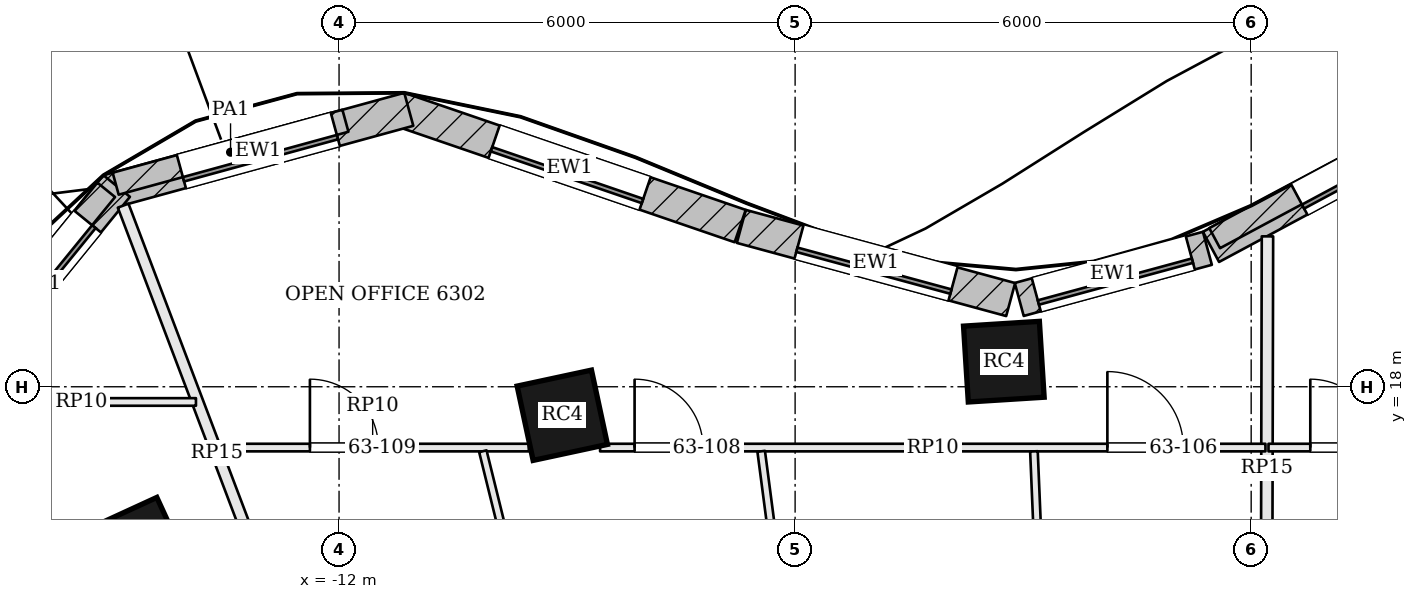
"""IFC4 building model, lengths in metres.
Left out: names, types, materials, properties, quantities, classifications, styles, units other than length and angle.
Written with IfcOpenShell. Run it as: python <this file> out.ifc"""

import sys

from ifc_helpers import new_model, si_unit, direction, frame, frame_2d, origin, origin_2d, place, context, subcontext, project, spatial, rectangle, extrude, element, fill, save


model = new_model("IFC4")
c1 = context("Model", 3, precision=1e-05, world=origin(), true_north=direction((0.0, 1.0)))
c2 = subcontext(c1, "Body", "Model", "MODEL_VIEW")
j1 = project(units=[si_unit("LENGTHUNIT", "METRE"), si_unit("PLANEANGLEUNIT", "RADIAN")], contexts=[c1])
p1 = place(None, origin())
s1 = spatial("IfcSite", under=j1, at=p1, CompositionType="ELEMENT")
p2 = place(p1, origin())
s2 = spatial("IfcBuilding", under=s1, at=p2, CompositionType="ELEMENT")
p3 = place(p2, frame((0.0, 0.0, 256.5)))
s3 = spatial("IfcBuildingStorey", under=s2, at=p3, CompositionType="ELEMENT", Elevation=256.5)
for number, where, z_axis, x_axis in (
    (1, (-3.254, 18.33, 0.0), (0.0, 0.0, 1.0), (-0.998, -0.063, 0.0)),
    (2, (-9.063, 17.625, 0.0), (0.0, 0.0, 1.0), (-0.978, -0.21, 0.0)),
    (3, (-14.643, 15.881, 0.0), (0.0, 0.0, 1.0), (-0.909, -0.417, 0.0)),
):
    element("IfcColumn", number, at=place(p3, frame(where, z_axis=z_axis, x_axis=x_axis)), inside=s3, PredefinedType="COLUMN", context=c2, shape_type="SweptSolid", body=[
        extrude(rectangle(XDim=1.0, YDim=1.0, at=origin_2d()), origin(), (0.0, 0.0, 1.0), 3.9),
    ])
p4 = place(p3, frame((3.646, 22.079, 0.0), z_axis=(0.0, 0.0, 1.0), x_axis=(-0.881279133897, -0.472596115259, 0.0)))
e4 = element("IfcWall", 4, at=p4, inside=s3, PredefinedType="SOLIDWALL", context=c2, shape_type="SweptSolid", body=[
    extrude(rectangle(XDim=4.737, YDim=0.45, at=frame_2d((2.368, 0.0))), origin(), (0.0, 0.0, 1.0), 3.7),
])
p5 = place(p4, frame((1.318, 0.0, 0.9)))
e5 = element("IfcOpeningElement", 5, at=p5, cuts=e4, PredefinedType="OPENING", context=c2, shape_type="SweptSolid", body=[
    extrude(rectangle(XDim=2.1, YDim=2.3, at=frame_2d((1.05, 1.15))), frame((0.0, 0.235, 0.0), z_axis=(0.0, -1.0, 0.0), x_axis=(1.0, 0.0, 0.0)), (0.0, 0.0, 1.0), 0.47),
])
p6 = place(p3, frame((-0.576, 19.821, 0.0), z_axis=(0.0, 0.0, 1.0), x_axis=(-0.965009398019, -0.262215296532, 0.0)))
e6 = element("IfcWall", 6, at=p6, inside=s3, PredefinedType="SOLIDWALL", context=c2, shape_type="SweptSolid", body=[
    extrude(rectangle(XDim=2.565, YDim=0.45, at=frame_2d((1.283, 0.0))), origin(), (0.0, 0.0, 1.0), 3.7),
])
p7 = place(p6, frame((0.233, 0.0, 0.9)))
e7 = element("IfcOpeningElement", 7, at=p7, cuts=e6, PredefinedType="OPENING", context=c2, shape_type="SweptSolid", body=[
    extrude(rectangle(XDim=2.1, YDim=2.3, at=frame_2d((1.05, 1.15))), frame((0.0, 0.235, 0.0), z_axis=(0.0, -1.0, 0.0), x_axis=(1.0, 0.0, 0.0)), (0.0, 0.0, 1.0), 0.47),
])
p8 = place(p3, frame((-3.164, 19.147, 0.0), z_axis=(0.0, 0.0, 1.0), x_axis=(-0.965039479998, 0.262104563191, 0.0)))
e8 = element("IfcWall", 8, at=p8, inside=s3, PredefinedType="SOLIDWALL", context=c2, shape_type="SweptSolid", body=[
    extrude(rectangle(XDim=3.672, YDim=0.45, at=frame_2d((1.836, 0.0))), origin(), (0.0, 0.0, 1.0), 3.7),
])
p9 = place(p8, frame((0.786, 0.0, 0.9)))
e9 = element("IfcOpeningElement", 9, at=p9, cuts=e8, PredefinedType="OPENING", context=c2, shape_type="SweptSolid", body=[
    extrude(rectangle(XDim=2.1, YDim=2.3, at=frame_2d((1.05, 1.15))), frame((0.0, 0.235, 0.0), z_axis=(0.0, -1.0, 0.0), x_axis=(1.0, 0.0, 0.0)), (0.0, 0.0, 1.0), 0.47),
])
p10 = place(p3, frame((-6.723, 20.114, 0.0), z_axis=(0.0, 0.0, 1.0), x_axis=(-0.945947299026, 0.324320377815, 0.0)))
e10 = element("IfcWall", 10, at=p10, inside=s3, PredefinedType="SOLIDWALL", context=c2, shape_type="SweptSolid", body=[
    extrude(rectangle(XDim=4.745, YDim=0.45, at=frame_2d((2.372, 0.0))), origin(), (0.0, 0.0, 1.0), 3.7),
])
p11 = place(p10, frame((1.322, 0.0, 0.9)))
e11 = element("IfcOpeningElement", 11, at=p11, cuts=e10, PredefinedType="OPENING", context=c2, shape_type="SweptSolid", body=[
    extrude(rectangle(XDim=2.1, YDim=2.3, at=frame_2d((1.05, 1.15))), frame((0.0, 0.235, 0.0), z_axis=(0.0, -1.0, 0.0), x_axis=(1.0, 0.0, 0.0)), (0.0, 0.0, 1.0), 0.47),
])
p12 = place(p3, frame((-11.083, 21.65, 0.0), z_axis=(0.0, 0.0, 1.0), x_axis=(-0.964483204983, -0.264144179011, 0.0)))
e12 = element("IfcWall", 12, at=p12, inside=s3, PredefinedType="SOLIDWALL", context=c2, shape_type="SweptSolid", body=[
    extrude(rectangle(XDim=4.104, YDim=0.45, at=frame_2d((2.052, 0.0))), origin(), (0.0, 0.0, 1.0), 3.7),
])
p13 = place(p12, frame((1.002, 0.0, 0.9)))
e13 = element("IfcOpeningElement", 13, at=p13, cuts=e12, PredefinedType="OPENING", context=c2, shape_type="SweptSolid", body=[
    extrude(rectangle(XDim=2.1, YDim=2.3, at=frame_2d((1.05, 1.15))), frame((0.0, 0.235, 0.0), z_axis=(0.0, -1.0, 0.0), x_axis=(1.0, 0.0, 0.0)), (0.0, 0.0, 1.0), 0.47),
])
p14 = place(p3, frame((-14.926, 20.641, 0.0), z_axis=(0.0, 0.0, 1.0), x_axis=(-0.631548074669, -0.775336720001, 0.0)))
e14 = element("IfcWall", 14, at=p14, inside=s3, PredefinedType="SOLIDWALL", context=c2, shape_type="SweptSolid", body=[
    extrude(rectangle(XDim=3.308, YDim=0.45, at=frame_2d((1.654, 0.0))), origin(), (0.0, 0.0, 1.0), 3.7),
])
p15 = place(p14, frame((0.604, 0.0, 0.9)))
e15 = element("IfcOpeningElement", 15, at=p15, cuts=e14, PredefinedType="OPENING", context=c2, shape_type="SweptSolid", body=[
    extrude(rectangle(XDim=2.1, YDim=2.3, at=frame_2d((1.05, 1.15))), frame((0.0, 0.235, 0.0), z_axis=(0.0, -1.0, 0.0), x_axis=(1.0, 0.0, 0.0)), (0.0, 0.0, 1.0), 0.47),
])
p16 = place(p3, frame((3.53, 22.106, 3.9), z_axis=(0.0, 0.0, 1.0), x_axis=(-0.881258931682, -0.472633785643, 0.0)))
e16 = element("IfcWall", 16, at=p16, inside=s3, PredefinedType="PARAPET", context=c2, shape_type="SweptSolid", body=[
    extrude(rectangle(XDim=4.55, YDim=0.3, at=frame_2d((2.275, 0.0))), origin(), (0.0, 0.0, 1.0), 1.1),
])
p17 = place(p3, frame((-11.916, 21.5, 3.9), z_axis=(0.0, 0.0, 1.0), x_axis=(-0.964473787466, -0.264178563271, 0.0)))
e17 = element("IfcWall", 17, at=p17, inside=s3, PredefinedType="PARAPET", context=c2, shape_type="SweptSolid", body=[
    extrude(rectangle(XDim=3.134, YDim=0.3, at=frame_2d((1.567, 0.0))), origin(), (0.0, 0.0, 1.0), 1.1),
])
p18 = place(p3, frame((-15.063, 20.591, 3.9), z_axis=(0.0, 0.0, 1.0), x_axis=(-0.631539712948, -0.775343530939, 0.0)))
e18 = element("IfcWall", 18, at=p18, inside=s3, PredefinedType="PARAPET", context=c2, shape_type="SweptSolid", body=[
    extrude(rectangle(XDim=3.182, YDim=0.3, at=frame_2d((1.591, 0.0))), origin(), (0.0, 0.0, 1.0), 1.1),
])
p19 = place(p3, frame((0.214, 19.979, 0.0), z_axis=(0.0, 0.0, 1.0), x_axis=(-0.002359899032, -0.999997215434, 0.0)))
e19 = element("IfcWall", 19, at=p19, inside=s3, PredefinedType="PARTITIONING", context=c2, shape_type="SweptSolid", body=[
    extrude(rectangle(XDim=6.104, YDim=0.15, at=frame_2d((3.052, 0.0))), origin(), (0.0, 0.0, 1.0), 3.084),
])
p20 = place(p3, frame((-14.841, 20.383, 0.0), z_axis=(0.0, 0.0, 1.0), x_axis=(0.354547510081, -0.935038000883, 0.0)))
e20 = element("IfcWall", 20, at=p20, inside=s3, PredefinedType="PARTITIONING", context=c2, shape_type="SweptSolid", body=[
    extrude(rectangle(XDim=6.965, YDim=0.15, at=frame_2d((3.482, 0.0))), origin(), (0.0, 0.0, 1.0), 3.084),
])
p21 = place(p3, frame((0.228, 17.2, 0.0), z_axis=(0.0, 0.0, 1.0), x_axis=(1.0, 0.0, 0.0)))
e21 = element("IfcWall", 21, at=p21, inside=s3, PredefinedType="PARTITIONING", context=c2, shape_type="SweptSolid", body=[
    extrude(rectangle(XDim=8.293, YDim=0.1, at=frame_2d((4.147, 0.0))), origin(), (0.0, 0.0, 1.0), 3.084),
])
p22 = place(p21, frame((0.55, 0.0, 0.0)))
e22 = element("IfcOpeningElement", 22, at=p22, cuts=e21, PredefinedType="OPENING", context=c2, shape_type="SweptSolid", body=[
    extrude(rectangle(XDim=0.9, YDim=2.1, at=frame_2d((0.45, 1.05))), frame((0.0, 0.06, 0.0), z_axis=(0.0, -1.0, 0.0), x_axis=(1.0, 0.0, 0.0)), (0.0, 0.0, 1.0), 0.12),
])
p23 = place(p3, frame((-13.612, 17.2, 0.0), z_axis=(0.0, 0.0, 1.0), x_axis=(1.0, 0.0, 0.0)))
e23 = element("IfcWall", 23, at=p23, inside=s3, PredefinedType="PARTITIONING", context=c2, shape_type="SweptSolid", body=[
    extrude(rectangle(XDim=4.109, YDim=0.1, at=frame_2d((2.054, 0.0))), origin(), (0.0, 0.0, 1.0), 3.084),
])
p24 = place(p23, frame((1.229, 0.0, 0.0)))
e24 = element("IfcOpeningElement", 24, at=p24, cuts=e23, PredefinedType="OPENING", context=c2, shape_type="SweptSolid", body=[
    extrude(rectangle(XDim=0.9, YDim=2.1, at=frame_2d((0.45, 1.05))), frame((0.0, 0.06, 0.0), z_axis=(0.0, -1.0, 0.0), x_axis=(1.0, 0.0, 0.0)), (0.0, 0.0, 1.0), 0.12),
])
p25 = place(p3, frame((-8.566, 17.2, 0.0), z_axis=(0.0, 0.0, 1.0), x_axis=(1.0, 0.0, 0.0)))
e25 = element("IfcWall", 25, at=p25, inside=s3, PredefinedType="PARTITIONING", context=c2, shape_type="SweptSolid", body=[
    extrude(rectangle(XDim=8.754, YDim=0.1, at=frame_2d((4.377, 0.0))), origin(), (0.0, 0.0, 1.0), 3.084),
])
p26 = place(p25, frame((6.674, 0.0, 0.0)))
e26 = element("IfcOpeningElement", 26, at=p26, cuts=e25, PredefinedType="OPENING", context=c2, shape_type="SweptSolid", body=[
    extrude(rectangle(XDim=1.0, YDim=2.1, at=frame_2d((0.5, 1.05))), frame((0.0, 0.06, 0.0), z_axis=(0.0, -1.0, 0.0), x_axis=(1.0, 0.0, 0.0)), (0.0, 0.0, 1.0), 0.12),
])
p27 = place(p25, frame((0.454, 0.0, 0.0)))
e27 = element("IfcOpeningElement", 27, at=p27, cuts=e25, PredefinedType="OPENING", context=c2, shape_type="SweptSolid", body=[
    extrude(rectangle(XDim=0.9, YDim=2.1, at=frame_2d((0.45, 1.05))), frame((0.0, 0.06, 0.0), z_axis=(0.0, -1.0, 0.0), x_axis=(1.0, 0.0, 0.0)), (0.0, 0.0, 1.0), 0.12),
])
p28 = place(p3, frame((-2.72, 13.875, 0.0), z_axis=(0.0, 0.0, 1.0), x_axis=(-0.042008508326, 0.999117252993, 0.0)))
e28 = element("IfcWall", 28, at=p28, inside=s3, PredefinedType="PARTITIONING", context=c2, shape_type="SweptSolid", body=[
    extrude(rectangle(XDim=3.278, YDim=0.1, at=frame_2d((1.639, 0.0))), origin(), (0.0, 0.0, 1.0), 3.084),
])
p29 = place(p3, frame((-6.017, 13.875, 0.0), z_axis=(0.0, 0.0, 1.0), x_axis=(-0.12990779889, 0.991526078219, 0.0)))
e29 = element("IfcWall", 29, at=p29, inside=s3, PredefinedType="PARTITIONING", context=c2, shape_type="SweptSolid", body=[
    extrude(rectangle(XDim=3.304, YDim=0.1, at=frame_2d((1.652, 0.0))), origin(), (0.0, 0.0, 1.0), 3.084),
])
p30 = place(p3, frame((-9.298, 13.873, 0.0), z_axis=(0.0, 0.0, 1.0), x_axis=(-0.239779199404, 0.970827448898, 0.0)))
e30 = element("IfcWall", 30, at=p30, inside=s3, PredefinedType="PARTITIONING", context=c2, shape_type="SweptSolid", body=[
    extrude(rectangle(XDim=3.377, YDim=0.1, at=frame_2d((1.689, 0.0))), origin(), (0.0, 0.0, 1.0), 3.084),
])
p31 = place(p3, frame((-16.897, 17.8, 0.0), z_axis=(0.0, 0.0, 1.0), x_axis=(1.0, 0.0, 0.0)))
e31 = element("IfcWall", 31, at=p31, inside=s3, PredefinedType="PARTITIONING", context=c2, shape_type="SweptSolid", body=[
    extrude(rectangle(XDim=3.014, YDim=0.1, at=frame_2d((1.507, 0.0))), origin(), (0.0, 0.0, 1.0), 3.084),
])
p32 = place(p3, frame((-14.835, 12.858, 0.0), z_axis=(0.0, 0.0, 1.0), x_axis=(-0.46402494572, 0.885822132118, 0.0)))
e32 = element("IfcWall", 32, at=p32, inside=s3, PredefinedType="PARTITIONING", context=c2, shape_type="SweptSolid", body=[
    extrude(rectangle(XDim=5.082, YDim=0.1, at=frame_2d((2.541, 0.0))), origin(), (0.0, 0.0, 1.0), 3.084),
])
p33 = place(p5, origin())
e33 = element("IfcWindow", 33, at=p33, inside=s3, PartitioningType="SINGLE_PANEL", PredefinedType="WINDOW", context=c2, shape_type="SweptSolid", body=[
    extrude(rectangle(XDim=2.1, YDim=2.3, at=frame_2d((1.05, 1.15))), frame((0.0, 0.135, 0.0), z_axis=(0.0, -1.0, 0.0), x_axis=(1.0, 0.0, 0.0)), (0.0, 0.0, 1.0), 0.06),
])
fill(e5, e33)
p34 = place(p7, origin())
e34 = element("IfcWindow", 34, at=p34, inside=s3, PartitioningType="SINGLE_PANEL", PredefinedType="WINDOW", context=c2, shape_type="SweptSolid", body=[
    extrude(rectangle(XDim=2.1, YDim=2.3, at=frame_2d((1.05, 1.15))), frame((0.0, 0.135, 0.0), z_axis=(0.0, -1.0, 0.0), x_axis=(1.0, 0.0, 0.0)), (0.0, 0.0, 1.0), 0.06),
])
fill(e7, e34)
p35 = place(p9, origin())
e35 = element("IfcWindow", 35, at=p35, inside=s3, PartitioningType="SINGLE_PANEL", PredefinedType="WINDOW", context=c2, shape_type="SweptSolid", body=[
    extrude(rectangle(XDim=2.1, YDim=2.3, at=frame_2d((1.05, 1.15))), frame((0.0, 0.135, 0.0), z_axis=(0.0, -1.0, 0.0), x_axis=(1.0, 0.0, 0.0)), (0.0, 0.0, 1.0), 0.06),
])
fill(e9, e35)
p36 = place(p11, origin())
e36 = element("IfcWindow", 36, at=p36, inside=s3, PartitioningType="SINGLE_PANEL", PredefinedType="WINDOW", context=c2, shape_type="SweptSolid", body=[
    extrude(rectangle(XDim=2.1, YDim=2.3, at=frame_2d((1.05, 1.15))), frame((0.0, 0.135, 0.0), z_axis=(0.0, -1.0, 0.0), x_axis=(1.0, 0.0, 0.0)), (0.0, 0.0, 1.0), 0.06),
])
fill(e11, e36)
p37 = place(p13, origin())
e37 = element("IfcWindow", 37, at=p37, inside=s3, PartitioningType="SINGLE_PANEL", PredefinedType="WINDOW", context=c2, shape_type="SweptSolid", body=[
    extrude(rectangle(XDim=2.1, YDim=2.3, at=frame_2d((1.05, 1.15))), frame((0.0, 0.135, 0.0), z_axis=(0.0, -1.0, 0.0), x_axis=(1.0, 0.0, 0.0)), (0.0, 0.0, 1.0), 0.06),
])
fill(e13, e37)
p38 = place(p15, origin())
e38 = element("IfcWindow", 38, at=p38, inside=s3, PartitioningType="SINGLE_PANEL", PredefinedType="WINDOW", context=c2, shape_type="SweptSolid", body=[
    extrude(rectangle(XDim=2.1, YDim=2.3, at=frame_2d((1.05, 1.15))), frame((0.0, 0.135, 0.0), z_axis=(0.0, -1.0, 0.0), x_axis=(1.0, 0.0, 0.0)), (0.0, 0.0, 1.0), 0.06),
])
fill(e15, e38)
p39 = place(p22, origin())
e39 = element("IfcDoor", 39, at=p39, inside=s3, OperationType="SINGLE_SWING_LEFT", PredefinedType="DOOR", context=c2, shape_type="SweptSolid", body=[
    extrude(rectangle(XDim=0.9, YDim=2.1, at=frame_2d((0.45, 1.05))), frame((0.0, 0.025, 0.0), z_axis=(0.0, -1.0, 0.0), x_axis=(1.0, 0.0, 0.0)), (0.0, 0.0, 1.0), 0.05),
])
fill(e22, e39)
p40 = place(p26, origin())
e40 = element("IfcDoor", 40, at=p40, inside=s3, OperationType="SINGLE_SWING_LEFT", PredefinedType="DOOR", context=c2, shape_type="SweptSolid", body=[
    extrude(rectangle(XDim=1.0, YDim=2.1, at=frame_2d((0.5, 1.05))), frame((0.0, 0.025, 0.0), z_axis=(0.0, -1.0, 0.0), x_axis=(1.0, 0.0, 0.0)), (0.0, 0.0, 1.0), 0.05),
])
fill(e26, e40)
p41 = place(p27, origin())
e41 = element("IfcDoor", 41, at=p41, inside=s3, OperationType="SINGLE_SWING_LEFT", PredefinedType="DOOR", context=c2, shape_type="SweptSolid", body=[
    extrude(rectangle(XDim=0.9, YDim=2.1, at=frame_2d((0.45, 1.05))), frame((0.0, 0.025, 0.0), z_axis=(0.0, -1.0, 0.0), x_axis=(1.0, 0.0, 0.0)), (0.0, 0.0, 1.0), 0.05),
])
fill(e27, e41)
p42 = place(p24, origin())
e42 = element("IfcDoor", 42, at=p42, inside=s3, OperationType="SINGLE_SWING_LEFT", PredefinedType="DOOR", context=c2, shape_type="SweptSolid", body=[
    extrude(rectangle(XDim=0.9, YDim=2.1, at=frame_2d((0.45, 1.05))), frame((0.0, 0.025, 0.0), z_axis=(0.0, -1.0, 0.0), x_axis=(1.0, 0.0, 0.0)), (0.0, 0.0, 1.0), 0.05),
])
fill(e24, e42)
save(model, sys.argv[1])
